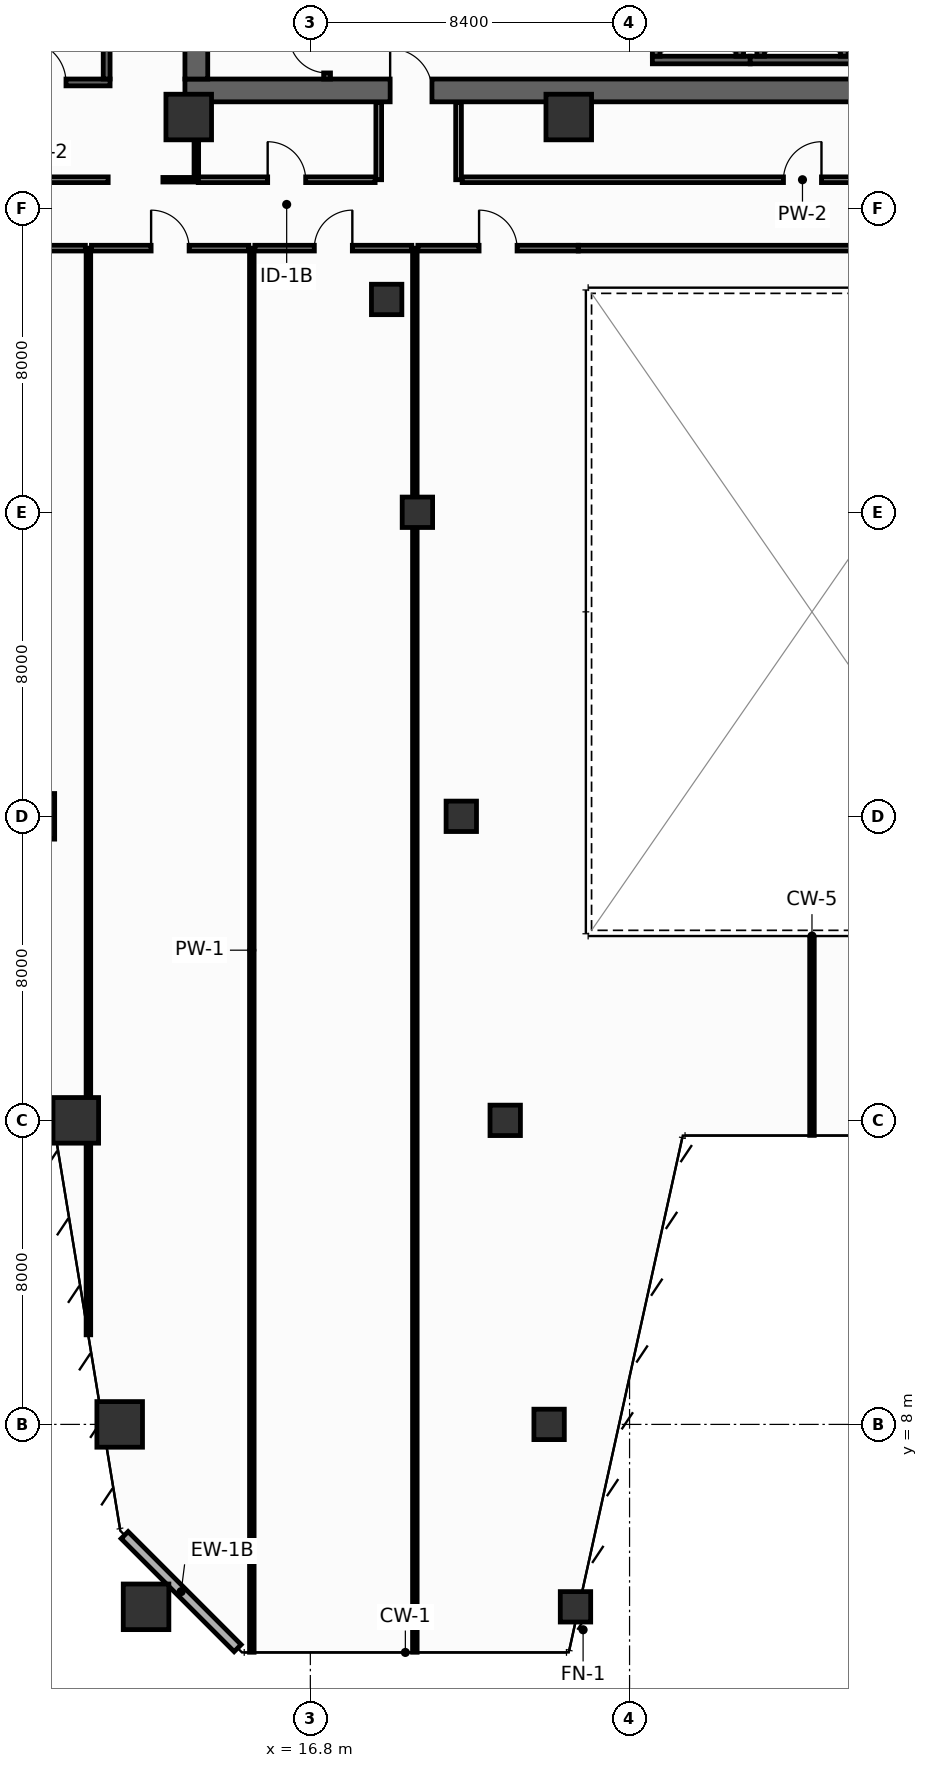
"""IFC4 building model, lengths in metres.
Left out: names, types, materials, properties, quantities, classifications, styles, units other than length and angle.
Written with IfcOpenShell. Run it as: python <this file> out.ifc"""

import sys

from ifc_helpers import new_model, si_unit, direction, frame, frame_2d, origin, origin_2d, place, context, subcontext, project, spatial, rectangle, hollow_rectangle, extrude, element, fill, save


model = new_model("IFC4")
c1 = context("Model", 3, precision=1e-05, world=origin(), true_north=direction((0.0, 1.0)))
c2 = subcontext(c1, "Body", "Model", "MODEL_VIEW")
j1 = project(units=[si_unit("LENGTHUNIT", "METRE"), si_unit("PLANEANGLEUNIT", "RADIAN")], contexts=[c1])
p1 = place(None, origin())
s1 = spatial("IfcSite", under=j1, at=p1, CompositionType="ELEMENT")
p2 = place(p1, origin())
s2 = spatial("IfcBuilding", under=s1, at=p2, CompositionType="ELEMENT")
p3 = place(p2, frame((0.0, 0.0, 78.0)))
s3 = spatial("IfcBuildingStorey", under=s2, at=p3, CompositionType="ELEMENT", Elevation=78.0)
p4 = place(p3, frame((13.5, 43.1, 0.0), z_axis=(0.0, 0.0, 1.0), x_axis=(1.0, 0.0, 0.0)))
e1 = element("IfcWall", 1, at=p4, inside=s3, PredefinedType="SHEAR", context=c2, shape_type="SweptSolid", body=[
    extrude(rectangle(XDim=32.9, YDim=0.6, at=frame_2d((16.45, 0.0))), origin(), (0.0, 0.0, 1.0), 4.15),
])
p5 = place(p4, frame((5.4, 0.0, 0.0)))
e2 = element("IfcOpeningElement", 2, at=p5, cuts=e1, PredefinedType="OPENING", context=c2, shape_type="SweptSolid", body=[
    extrude(rectangle(XDim=1.1, YDim=2.15, at=frame_2d((0.55, 1.075))), frame((0.0, 0.31, 0.0), z_axis=(0.0, -1.0, 0.0), x_axis=(1.0, 0.0, 0.0)), (0.0, 0.0, 1.0), 0.62),
])
p6 = place(p4, frame((25.6, 0.0, 0.0)))
e3 = element("IfcOpeningElement", 3, at=p6, cuts=e1, PredefinedType="OPENING", context=c2, shape_type="SweptSolid", body=[
    extrude(rectangle(XDim=1.1, YDim=2.15, at=frame_2d((0.55, 1.075))), frame((0.0, 0.31, 0.0), z_axis=(0.0, -1.0, 0.0), x_axis=(1.0, 0.0, 0.0)), (0.0, 0.0, 1.0), 0.62),
])
p7 = place(p3, frame((13.8, 43.4, 0.0), z_axis=(0.0, 0.0, 1.0), x_axis=(0.0, 1.0, 0.0)))
e4 = element("IfcWall", 4, at=p7, inside=s3, PredefinedType="SHEAR", context=c2, shape_type="SweptSolid", body=[
    extrude(rectangle(XDim=10.4, YDim=0.6, at=frame_2d((5.2, 0.0))), origin(), (0.0, 0.0, 1.0), 4.15),
])
for number, where, z_axis, x_axis in (
    (5, (13.6, 42.4, 0.0), (0.0, 0.0, 1.0), (1.0, 0.0, 0.0)),
    (6, (23.6, 42.4, 0.0), (0.0, 0.0, 1.0), (1.0, 0.0, 0.0)),
    (7, (12.477, 3.2, 0.0), (0.0, 0.0, 1.0), (1.0, 0.0, 0.0)),
):
    element("IfcColumn", number, at=place(p3, frame(where, z_axis=z_axis, x_axis=x_axis)), inside=s3, PredefinedType="COLUMN", context=c2, shape_type="SweptSolid", body=[
        extrude(hollow_rectangle(XDim=1.2, YDim=1.2, WallThickness=0.055, at=origin_2d()), origin(), (0.0, 0.0, 1.0), 4.4),
    ])
p8 = place(p3, frame((23.777, 3.2, 0.0), z_axis=(0.0, 0.0, 1.0), x_axis=(1.0, 0.0, 0.0)))
e8 = element("IfcColumn", 8, at=p8, inside=s3, PredefinedType="COLUMN", context=c2, shape_type="SweptSolid", body=[
    extrude(hollow_rectangle(XDim=0.8, YDim=0.8, WallThickness=0.036, at=origin_2d()), origin(), (0.0, 0.0, 1.0), 4.4),
])
p9 = place(p3, frame((11.783, 8.0, 0.0), z_axis=(0.0, 0.0, 1.0), x_axis=(1.0, 0.0, 0.0)))
e9 = element("IfcColumn", 9, at=p9, inside=s3, PredefinedType="COLUMN", context=c2, shape_type="SweptSolid", body=[
    extrude(hollow_rectangle(XDim=1.2, YDim=1.2, WallThickness=0.055, at=origin_2d()), origin(), (0.0, 0.0, 1.0), 4.4),
])
p10 = place(p3, frame((23.083, 8.0, 0.0), z_axis=(0.0, 0.0, 1.0), x_axis=(1.0, 0.0, 0.0)))
e10 = element("IfcColumn", 10, at=p10, inside=s3, PredefinedType="COLUMN", context=c2, shape_type="SweptSolid", body=[
    extrude(hollow_rectangle(XDim=0.8, YDim=0.8, WallThickness=0.036, at=origin_2d()), origin(), (0.0, 0.0, 1.0), 4.4),
])
p11 = place(p3, frame((10.628, 16.0, 0.0), z_axis=(0.0, 0.0, 1.0), x_axis=(1.0, 0.0, 0.0)))
e11 = element("IfcColumn", 11, at=p11, inside=s3, PredefinedType="COLUMN", context=c2, shape_type="SweptSolid", body=[
    extrude(hollow_rectangle(XDim=1.2, YDim=1.2, WallThickness=0.055, at=origin_2d()), origin(), (0.0, 0.0, 1.0), 4.4),
])
p12 = place(p3, frame((21.928, 16.0, 0.0), z_axis=(0.0, 0.0, 1.0), x_axis=(1.0, 0.0, 0.0)))
e12 = element("IfcColumn", 12, at=p12, inside=s3, PredefinedType="COLUMN", context=c2, shape_type="SweptSolid", body=[
    extrude(hollow_rectangle(XDim=0.8, YDim=0.8, WallThickness=0.036, at=origin_2d()), origin(), (0.0, 0.0, 1.0), 4.4),
])
p13 = place(p3, frame((9.472, 24.0, 0.0), z_axis=(0.0, 0.0, 1.0), x_axis=(1.0, 0.0, 0.0)))
e13 = element("IfcColumn", 13, at=p13, inside=s3, PredefinedType="COLUMN", context=c2, shape_type="SweptSolid", body=[
    extrude(hollow_rectangle(XDim=1.2, YDim=1.2, WallThickness=0.055, at=origin_2d()), origin(), (0.0, 0.0, 1.0), 4.4),
])
for number, where, z_axis, x_axis in (
    (14, (20.772, 24.0, 0.0), (0.0, 0.0, 1.0), (1.0, 0.0, 0.0)),
    (15, (19.617, 32.0, 0.0), (0.0, 0.0, 1.0), (1.0, 0.0, 0.0)),
    (16, (18.808, 37.6, 0.0), (0.0, 0.0, 1.0), (1.0, 0.0, 0.0)),
):
    element("IfcColumn", number, at=place(p3, frame(where, z_axis=z_axis, x_axis=x_axis)), inside=s3, PredefinedType="COLUMN", context=c2, shape_type="SweptSolid", body=[
        extrude(hollow_rectangle(XDim=0.8, YDim=0.8, WallThickness=0.036, at=origin_2d()), origin(), (0.0, 0.0, 1.0), 4.4),
    ])
p14 = place(p3, frame((25.8, 43.9, 0.0), z_axis=(0.0, 0.0, 1.0), x_axis=(1.0, 0.0, 0.0)))
e17 = element("IfcWall", 17, at=p14, inside=s3, PredefinedType="SHEAR", context=c2, shape_type="SweptSolid", body=[
    extrude(rectangle(XDim=2.575, YDim=0.2, at=frame_2d((1.288, 0.0))), origin(), (0.0, 0.0, 1.0), 4.15),
])
for number, where, z_axis, x_axis in (
    (18, (25.9, 44.0, 0.0), (0.0, 0.0, 1.0), (0.0, 1.0, 0.0)),
    (19, (28.1, 44.0, 0.0), (0.0, 0.0, 1.0), (0.0, 1.0, 0.0)),
):
    element("IfcWall", number, at=place(p3, frame(where, z_axis=z_axis, x_axis=x_axis)), inside=s3, PredefinedType="SHEAR", context=c2, shape_type="SweptSolid", body=[
        extrude(rectangle(XDim=2.3, YDim=0.2, at=frame_2d((1.15, 0.0))), origin(), (0.0, 0.0, 1.0), 4.15),
    ])
p15 = place(p3, frame((28.375, 43.9, 0.0), z_axis=(0.0, 0.0, 1.0), x_axis=(1.0, 0.0, 0.0)))
e20 = element("IfcWall", 20, at=p15, inside=s3, PredefinedType="SHEAR", context=c2, shape_type="SweptSolid", body=[
    extrude(rectangle(XDim=2.75, YDim=0.2, at=frame_2d((1.375, 0.0))), origin(), (0.0, 0.0, 1.0), 4.15),
])
for number, where, z_axis, x_axis in (
    (21, (28.65, 44.0, 0.0), (0.0, 0.0, 1.0), (0.0, 1.0, 0.0)),
    (22, (30.85, 44.0, 0.0), (0.0, 0.0, 1.0), (0.0, 1.0, 0.0)),
):
    element("IfcWall", number, at=place(p3, frame(where, z_axis=z_axis, x_axis=x_axis)), inside=s3, PredefinedType="SHEAR", context=c2, shape_type="SweptSolid", body=[
        extrude(rectangle(XDim=2.3, YDim=0.2, at=frame_2d((1.15, 0.0))), origin(), (0.0, 0.0, 1.0), 4.15),
    ])
p16 = place(p3, frame((17.24, 43.4, 0.0), z_axis=(0.0, 0.0, 1.0), x_axis=(0.0, 1.0, 0.0)))
e23 = element("IfcWall", 23, at=p16, inside=s3, PredefinedType="SHEAR", context=c2, shape_type="SweptSolid", body=[
    extrude(rectangle(XDim=10.4, YDim=0.18, at=frame_2d((5.2, 0.0))), origin(), (0.0, 0.0, 1.0), 4.15),
])
p17 = place(p16, frame((0.16, 0.0, 0.0)))
e24 = element("IfcOpeningElement", 24, at=p17, cuts=e23, PredefinedType="OPENING", context=c2, shape_type="SweptSolid", body=[
    extrude(rectangle(XDim=1.0, YDim=2.15, at=frame_2d((0.5, 1.075))), frame((0.0, 0.1, 0.0), z_axis=(0.0, -1.0, 0.0), x_axis=(1.0, 0.0, 0.0)), (0.0, 0.0, 1.0), 0.2),
])
p18 = place(p3, frame((8.12, 43.31, 0.0), z_axis=(0.0, 0.0, 1.0), x_axis=(1.0, 0.0, 0.0)))
e25 = element("IfcWall", 25, at=p18, inside=s3, PredefinedType="SHEAR", context=c2, shape_type="SweptSolid", body=[
    extrude(rectangle(XDim=3.41, YDim=0.18, at=frame_2d((1.705, 0.0))), origin(), (0.0, 0.0, 1.0), 4.15),
])
p19 = place(p18, frame((1.15, 0.0, 0.0)))
e26 = element("IfcOpeningElement", 26, at=p19, cuts=e25, PredefinedType="OPENING", context=c2, shape_type="SweptSolid", body=[
    extrude(rectangle(XDim=1.1, YDim=2.15, at=frame_2d((0.55, 1.075))), frame((0.0, 0.1, 0.0), z_axis=(0.0, -1.0, 0.0), x_axis=(1.0, 0.0, 0.0)), (0.0, 0.0, 1.0), 0.2),
])
p20 = place(p3, frame((11.44, 43.4, 0.0), z_axis=(0.0, 0.0, 1.0), x_axis=(0.0, 1.0, 0.0)))
e27 = element("IfcWall", 27, at=p20, inside=s3, PredefinedType="SHEAR", context=c2, shape_type="SweptSolid", body=[
    extrude(rectangle(XDim=10.4, YDim=0.18, at=frame_2d((5.2, 0.0))), origin(), (0.0, 0.0, 1.0), 4.15),
])
p21 = place(p3, frame((11.913, 5.087, 0.0), z_axis=(0.0, 0.0, 1.0), x_axis=(0.707106781187, -0.707106781187, 0.0)))
e28 = element("IfcWall", 28, at=p21, inside=s3, PredefinedType="STANDARD", context=c2, shape_type="SweptSolid", body=[
    extrude(rectangle(XDim=4.206, YDim=0.26, at=frame_2d((2.103, 0.0))), origin(), (0.0, 0.0, 1.0), 4.15),
])
p22 = place(p3, frame((12.92, 40.75, 0.0), z_axis=(0.0, 0.0, 1.0), x_axis=(1.0, 0.0, 0.0)))
e29 = element("IfcWall", 29, at=p22, inside=s3, PredefinedType="PARTITIONING", context=c2, shape_type="SweptSolid", body=[
    extrude(rectangle(XDim=0.93, YDim=0.12, at=frame_2d((0.465, 0.0))), origin(), (0.0, 0.0, 1.0), 4.15),
])
p23 = place(p3, frame((13.8, 40.83, 0.0), z_axis=(0.0, 0.0, 1.0), x_axis=(0.0, 1.0, 0.0)))
e30 = element("IfcWall", 30, at=p23, inside=s3, PredefinedType="PARTITIONING", context=c2, shape_type="SweptSolid", body=[
    extrude(rectangle(XDim=1.95, YDim=0.12, at=frame_2d((0.975, 0.0))), origin(), (0.0, 0.0, 1.0), 4.15),
])
p24 = place(p3, frame((8.18, 40.75, 0.0), z_axis=(0.0, 0.0, 1.0), x_axis=(1.0, 0.0, 0.0)))
e31 = element("IfcWall", 31, at=p24, inside=s3, PredefinedType="PARTITIONING", context=c2, shape_type="SweptSolid", body=[
    extrude(rectangle(XDim=3.3, YDim=0.15, at=frame_2d((1.65, 0.0))), origin(), (0.0, 0.0, 1.0), 4.15),
])
for number, where, z_axis, x_axis in (
    (32, (18.6, 40.75, 0.0), (0.0, 0.0, 1.0), (0.0, 1.0, 0.0)),
    (33, (20.7, 40.75, 0.0), (0.0, 0.0, 1.0), (0.0, 1.0, 0.0)),
):
    element("IfcWall", number, at=place(p3, frame(where, z_axis=z_axis, x_axis=x_axis)), inside=s3, PredefinedType="PARTITIONING", context=c2, shape_type="SweptSolid", body=[
        extrude(rectangle(XDim=2.03, YDim=0.15, at=frame_2d((1.015, 0.0))), origin(), (0.0, 0.0, 1.0), 4.15),
    ])
p25 = place(p3, frame((13.85, 40.75, 0.0), z_axis=(0.0, 0.0, 1.0), x_axis=(1.0, 0.0, 0.0)))
e34 = element("IfcWall", 34, at=p25, inside=s3, PredefinedType="PARTITIONING", context=c2, shape_type="SweptSolid", body=[
    extrude(rectangle(XDim=4.655, YDim=0.15, at=frame_2d((2.327, 0.0))), origin(), (0.0, 0.0, 1.0), 4.15),
])
p26 = place(p25, frame((1.827, 0.0, 0.0)))
e35 = element("IfcOpeningElement", 35, at=p26, cuts=e34, PredefinedType="OPENING", context=c2, shape_type="SweptSolid", body=[
    extrude(rectangle(XDim=1.0, YDim=2.15, at=frame_2d((0.5, 1.075))), frame((0.0, 0.085, 0.0), z_axis=(0.0, -1.0, 0.0), x_axis=(1.0, 0.0, 0.0)), (0.0, 0.0, 1.0), 0.17),
])
p27 = place(p3, frame((20.795, 40.75, 0.0), z_axis=(0.0, 0.0, 1.0), x_axis=(1.0, 0.0, 0.0)))
e36 = element("IfcWall", 36, at=p27, inside=s3, PredefinedType="PARTITIONING", context=c2, shape_type="SweptSolid", body=[
    extrude(rectangle(XDim=17.91, YDim=0.15, at=frame_2d((8.955, 0.0))), origin(), (0.0, 0.0, 1.0), 3.335),
])
p28 = place(p27, frame((8.455, 0.0, 0.0)))
e37 = element("IfcOpeningElement", 37, at=p28, cuts=e36, PredefinedType="OPENING", context=c2, shape_type="SweptSolid", body=[
    extrude(rectangle(XDim=1.0, YDim=2.15, at=frame_2d((0.5, 1.075))), frame((0.0, 0.085, 0.0), z_axis=(0.0, -1.0, 0.0), x_axis=(1.0, 0.0, 0.0)), (0.0, 0.0, 1.0), 0.17),
])
p29 = place(p3, frame((10.96, 10.357, 0.0), z_axis=(0.0, 0.0, 1.0), x_axis=(0.0, 1.0, 0.0)))
e38 = element("IfcWall", 38, at=p29, inside=s3, PredefinedType="PARTITIONING", context=c2, shape_type="SweptSolid", body=[
    extrude(rectangle(XDim=28.593, YDim=0.12, at=frame_2d((14.296, 0.0))), origin(), (0.0, 0.0, 1.0), 3.335),
])
for number, where, z_axis, x_axis in (
    (39, (15.26, 2.005, 0.0), (0.0, 0.0, 1.0), (0.0, 1.0, 0.0)),
    (40, (19.55, 2.005, 0.0), (0.0, 0.0, 1.0), (0.0, 1.0, 0.0)),
):
    element("IfcWall", number, at=place(p3, frame(where, z_axis=z_axis, x_axis=x_axis)), inside=s3, PredefinedType="PARTITIONING", context=c2, shape_type="SweptSolid", body=[
        extrude(rectangle(XDim=36.945, YDim=0.12, at=frame_2d((18.473, 0.0))), origin(), (0.0, 0.0, 1.0), 3.335),
    ])
p30 = place(p3, frame((30.0, 15.605, 0.0), z_axis=(0.0, 0.0, 1.0), x_axis=(0.0, 1.0, 0.0)))
e41 = element("IfcWall", 41, at=p30, inside=s3, PredefinedType="PARTITIONING", context=c2, shape_type="SweptSolid", body=[
    extrude(rectangle(XDim=5.175, YDim=0.12, at=frame_2d((2.587, 0.0))), origin(), (0.0, 0.0, 1.0), 4.15),
])
p31 = place(p3, frame((6.363, 38.95, 0.0), z_axis=(0.0, 0.0, 1.0), x_axis=(1.0, 0.0, 0.0)))
e42 = element("IfcWall", 42, at=p31, inside=s3, PredefinedType="PARTITIONING", context=c2, shape_type="SweptSolid", body=[
    extrude(rectangle(XDim=4.517, YDim=0.15, at=frame_2d((2.259, 0.0))), origin(), (0.0, 0.0, 1.0), 3.635),
])
p32 = place(p31, frame((1.979, 0.0, 0.0)))
e43 = element("IfcOpeningElement", 43, at=p32, cuts=e42, PredefinedType="OPENING", context=c2, shape_type="SweptSolid", body=[
    extrude(rectangle(XDim=1.0, YDim=2.15, at=frame_2d((0.5, 1.075))), frame((0.0, 0.085, 0.0), z_axis=(0.0, -1.0, 0.0), x_axis=(1.0, 0.0, 0.0)), (0.0, 0.0, 1.0), 0.17),
])
p33 = place(p3, frame((11.04, 38.95, 0.0), z_axis=(0.0, 0.0, 1.0), x_axis=(1.0, 0.0, 0.0)))
e44 = element("IfcWall", 44, at=p33, inside=s3, PredefinedType="PARTITIONING", context=c2, shape_type="SweptSolid", body=[
    extrude(rectangle(XDim=4.14, YDim=0.15, at=frame_2d((2.07, 0.0))), origin(), (0.0, 0.0, 1.0), 4.15),
])
p34 = place(p33, frame((1.57, 0.0, 0.0)))
e45 = element("IfcOpeningElement", 45, at=p34, cuts=e44, PredefinedType="OPENING", context=c2, shape_type="SweptSolid", body=[
    extrude(rectangle(XDim=1.0, YDim=2.15, at=frame_2d((0.5, 1.075))), frame((0.0, 0.085, 0.0), z_axis=(0.0, -1.0, 0.0), x_axis=(1.0, 0.0, 0.0)), (0.0, 0.0, 1.0), 0.17),
])
p35 = place(p3, frame((15.34, 38.95, 0.0), z_axis=(0.0, 0.0, 1.0), x_axis=(1.0, 0.0, 0.0)))
e46 = element("IfcWall", 46, at=p35, inside=s3, PredefinedType="PARTITIONING", context=c2, shape_type="SweptSolid", body=[
    extrude(rectangle(XDim=4.13, YDim=0.15, at=frame_2d((2.065, 0.0))), origin(), (0.0, 0.0, 1.0), 4.15),
])
p36 = place(p35, frame((1.565, 0.0, 0.0)))
e47 = element("IfcOpeningElement", 47, at=p36, cuts=e46, PredefinedType="OPENING", context=c2, shape_type="SweptSolid", body=[
    extrude(rectangle(XDim=1.0, YDim=2.15, at=frame_2d((0.5, 1.075))), frame((0.0, 0.085, 0.0), z_axis=(0.0, -1.0, 0.0), x_axis=(1.0, 0.0, 0.0)), (0.0, 0.0, 1.0), 0.17),
])
p37 = place(p3, frame((19.63, 38.95, 0.0), z_axis=(0.0, 0.0, 1.0), x_axis=(1.0, 0.0, 0.0)))
e48 = element("IfcWall", 48, at=p37, inside=s3, PredefinedType="PARTITIONING", context=c2, shape_type="SweptSolid", body=[
    extrude(rectangle(XDim=4.22, YDim=0.15, at=frame_2d((2.11, 0.0))), origin(), (0.0, 0.0, 1.0), 3.335),
])
p38 = place(p37, frame((1.61, 0.0, 0.0)))
e49 = element("IfcOpeningElement", 49, at=p38, cuts=e48, PredefinedType="OPENING", context=c2, shape_type="SweptSolid", body=[
    extrude(rectangle(XDim=1.0, YDim=2.15, at=frame_2d((0.5, 1.075))), frame((0.0, 0.085, 0.0), z_axis=(0.0, -1.0, 0.0), x_axis=(1.0, 0.0, 0.0)), (0.0, 0.0, 1.0), 0.17),
])
p39 = place(p3, frame((23.85, 38.95, 0.0), z_axis=(0.0, 0.0, 1.0), x_axis=(1.0, 0.0, 0.0)))
e50 = element("IfcWall", 50, at=p39, inside=s3, PredefinedType="PARTITIONING", context=c2, shape_type="SweptSolid", body=[
    extrude(rectangle(XDim=12.3, YDim=0.15, at=frame_2d((6.15, 0.0))), origin(), (0.0, 0.0, 1.0), 4.15),
])
p40 = place(p17, origin())
e51 = element("IfcDoor", 51, at=p40, inside=s3, OperationType="SINGLE_SWING_RIGHT", PredefinedType="DOOR", context=c2, shape_type="SweptSolid", body=[
    extrude(rectangle(XDim=1.0, YDim=2.15, at=frame_2d((0.5, 1.075))), frame((0.0, 0.025, 0.0), z_axis=(0.0, -1.0, 0.0), x_axis=(1.0, 0.0, 0.0)), (0.0, 0.0, 1.0), 0.05),
])
fill(e24, e51)
p41 = place(p19, origin())
e52 = element("IfcDoor", 52, at=p41, inside=s3, OperationType="SINGLE_SWING_LEFT", PredefinedType="DOOR", context=c2, shape_type="SweptSolid", body=[
    extrude(rectangle(XDim=1.1, YDim=2.15, at=frame_2d((0.55, 1.075))), frame((0.0, 0.025, 0.0), z_axis=(0.0, -1.0, 0.0), x_axis=(1.0, 0.0, 0.0)), (0.0, 0.0, 1.0), 0.05),
])
fill(e26, e52)
p42 = place(p5, origin())
e53 = element("IfcDoor", 53, at=p42, inside=s3, OperationType="SINGLE_SWING_LEFT", PredefinedType="DOOR", context=c2, shape_type="SweptSolid", body=[
    extrude(rectangle(XDim=1.1, YDim=2.15, at=frame_2d((0.55, 1.075))), frame((0.0, 0.025, 0.0), z_axis=(0.0, -1.0, 0.0), x_axis=(1.0, 0.0, 0.0)), (0.0, 0.0, 1.0), 0.05),
])
fill(e2, e53)
p43 = place(p26, origin())
e54 = element("IfcDoor", 54, at=p43, inside=s3, OperationType="SINGLE_SWING_LEFT", PredefinedType="DOOR", context=c2, shape_type="SweptSolid", body=[
    extrude(rectangle(XDim=1.0, YDim=2.15, at=frame_2d((0.5, 1.075))), frame((0.0, 0.025, 0.0), z_axis=(0.0, -1.0, 0.0), x_axis=(1.0, 0.0, 0.0)), (0.0, 0.0, 1.0), 0.05),
])
fill(e35, e54)
p44 = place(p28, origin())
e55 = element("IfcDoor", 55, at=p44, inside=s3, OperationType="SINGLE_SWING_RIGHT", PredefinedType="DOOR", context=c2, shape_type="SweptSolid", body=[
    extrude(rectangle(XDim=1.0, YDim=2.15, at=frame_2d((0.5, 1.075))), frame((0.0, 0.025, 0.0), z_axis=(0.0, -1.0, 0.0), x_axis=(1.0, 0.0, 0.0)), (0.0, 0.0, 1.0), 0.05),
])
fill(e37, e55)
p45 = place(p34, origin())
e56 = element("IfcDoor", 56, at=p45, inside=s3, OperationType="SINGLE_SWING_LEFT", PredefinedType="DOOR", context=c2, shape_type="SweptSolid", body=[
    extrude(rectangle(XDim=1.0, YDim=2.15, at=frame_2d((0.5, 1.075))), frame((0.0, 0.025, 0.0), z_axis=(0.0, -1.0, 0.0), x_axis=(1.0, 0.0, 0.0)), (0.0, 0.0, 1.0), 0.05),
])
fill(e45, e56)
p46 = place(p36, origin())
e57 = element("IfcDoor", 57, at=p46, inside=s3, OperationType="SINGLE_SWING_RIGHT", PredefinedType="DOOR", context=c2, shape_type="SweptSolid", body=[
    extrude(rectangle(XDim=1.0, YDim=2.15, at=frame_2d((0.5, 1.075))), frame((0.0, 0.025, 0.0), z_axis=(0.0, -1.0, 0.0), x_axis=(1.0, 0.0, 0.0)), (0.0, 0.0, 1.0), 0.05),
])
fill(e47, e57)
p47 = place(p38, origin())
e58 = element("IfcDoor", 58, at=p47, inside=s3, OperationType="SINGLE_SWING_LEFT", PredefinedType="DOOR", context=c2, shape_type="SweptSolid", body=[
    extrude(rectangle(XDim=1.0, YDim=2.15, at=frame_2d((0.5, 1.075))), frame((0.0, 0.025, 0.0), z_axis=(0.0, -1.0, 0.0), x_axis=(1.0, 0.0, 0.0)), (0.0, 0.0, 1.0), 0.05),
])
fill(e49, e58)
save(model, sys.argv[1])
